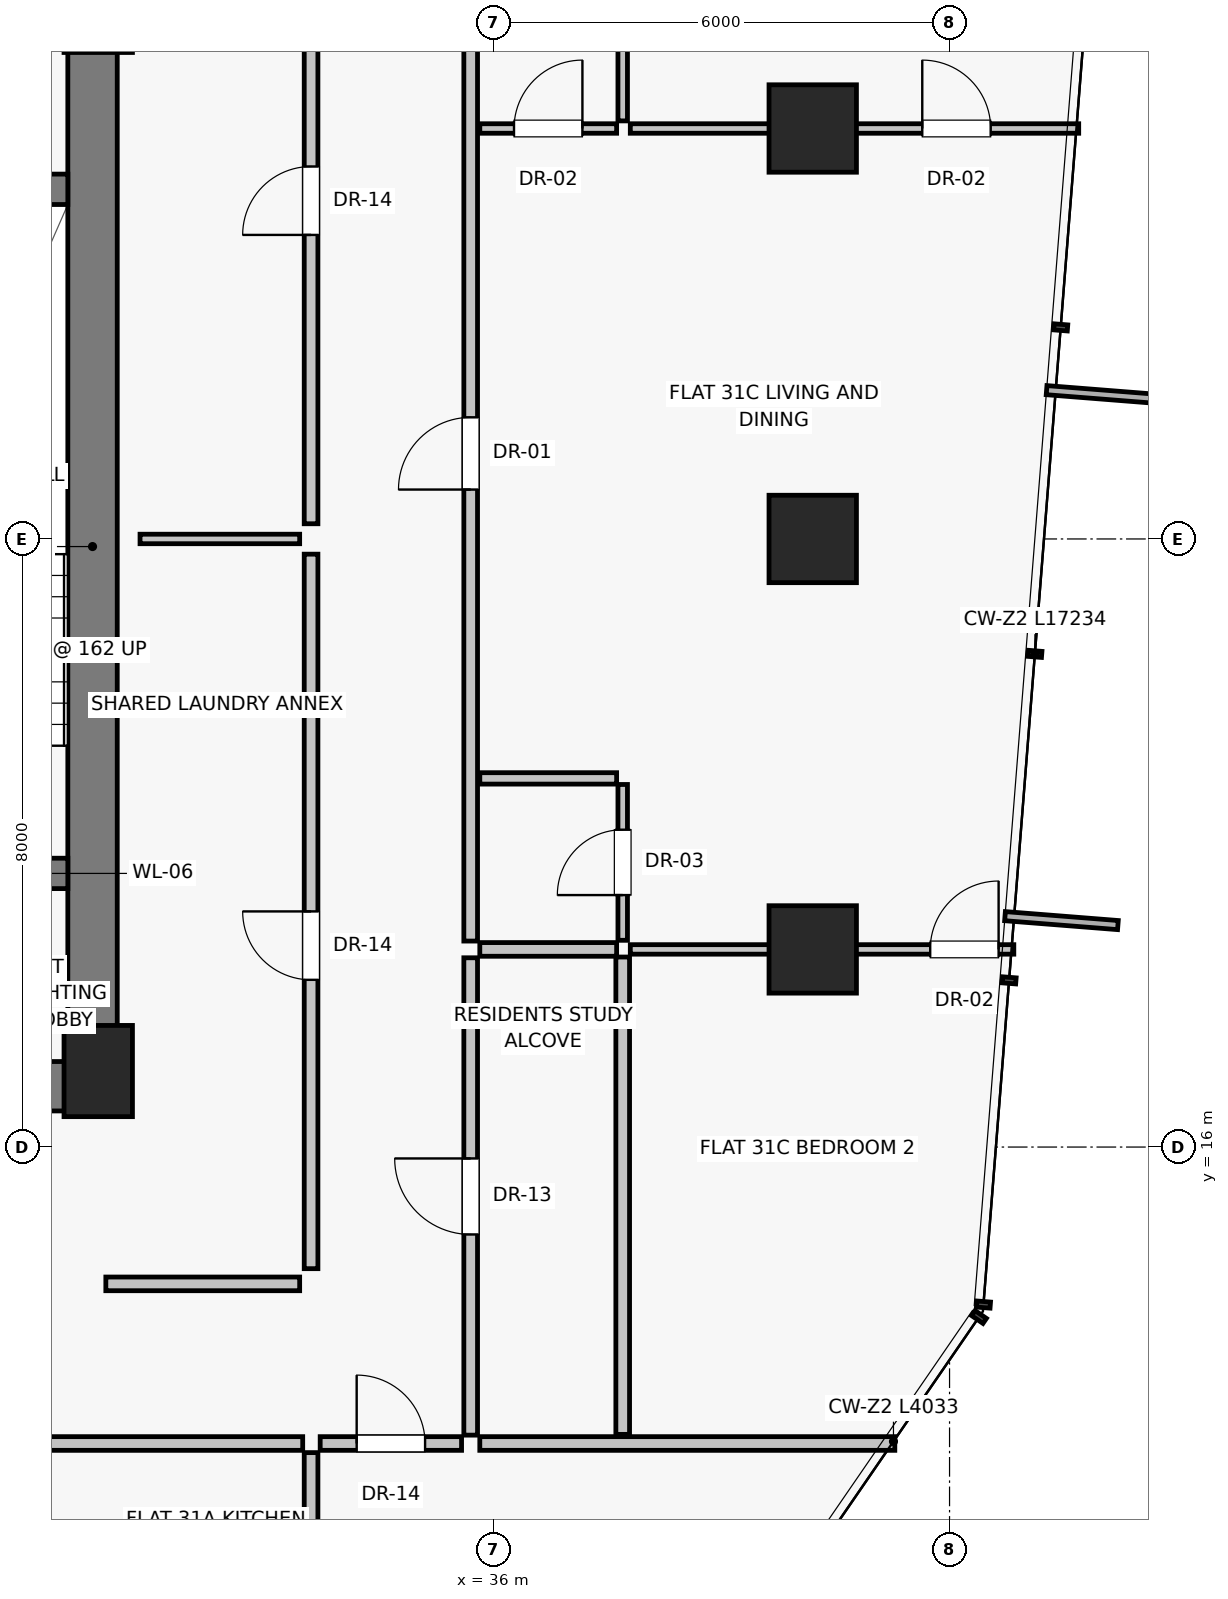
"""IFC4 building model, lengths in metres.
Left out: names, types, materials, properties, quantities, classifications, styles, units other than length and angle.
Written with IfcOpenShell. Run it as: python <this file> out.ifc"""

import sys

from ifc_helpers import new_model, si_unit, direction, frame, frame_2d, origin, origin_2d, place, context, subcontext, project, spatial, rectangle, extrude, source, transform, mapped, element, fill, save


model = new_model("IFC4")
c1 = context("Model", 3, precision=1e-05, world=origin(), true_north=direction((0.0, 1.0)))
c2 = subcontext(c1, "Body", "Model", "MODEL_VIEW")
j1 = project(units=[si_unit("LENGTHUNIT", "METRE"), si_unit("PLANEANGLEUNIT", "RADIAN")], contexts=[c1])
p1 = place(None, origin())
s1 = spatial("IfcSite", under=j1, at=p1, CompositionType="ELEMENT")
p2 = place(p1, origin())
s2 = spatial("IfcBuilding", under=s1, at=p2, CompositionType="ELEMENT")
p3 = place(p2, frame((0.0, 0.0, 113.25)))
s3 = spatial("IfcBuildingStorey", under=s2, at=p3, CompositionType="ELEMENT", Elevation=113.25)
p4 = place(p3, frame((30.8, 17.0, 0.0), z_axis=(0.0, 0.0, 1.0), x_axis=(1.0, 0.0, 0.0)))
e1 = element("IfcColumn", 1, at=p4, inside=s3, PredefinedType="PILASTER", context=c2, shape_type="SweptSolid", body=[
    extrude(rectangle(XDim=0.9, YDim=1.2, at=origin_2d()), origin(), (0.0, 0.0, 1.0), 3.25),
])
for number, where, z_axis, x_axis in (
    (2, (40.2, 18.6, 0.0), (0.0, 0.0, 1.0), (1.0, 0.0, 0.0)),
    (3, (40.2, 24.0, 0.0), (0.0, 0.0, 1.0), (1.0, 0.0, 0.0)),
    (4, (40.2, 29.4, 0.0), (0.0, 0.0, 1.0), (1.0, 0.0, 0.0)),
):
    element("IfcColumn", number, at=place(p3, frame(where, z_axis=z_axis, x_axis=x_axis)), inside=s3, PredefinedType="COLUMN", context=c2, shape_type="SweptSolid", body=[
        extrude(rectangle(XDim=1.15, YDim=1.15, at=origin_2d()), origin(), (0.0, 0.0, 1.0), 3.25),
    ])
p5 = place(p3, frame((30.725, 16.8, 0.0), z_axis=(0.0, 0.0, 1.0), x_axis=(0.0, 1.0, 0.0)))
e5 = element("IfcWall", 5, at=p5, inside=s3, PredefinedType="SHEAR", context=c2, shape_type="SweptSolid", body=[
    extrude(rectangle(XDim=14.2, YDim=0.65, at=frame_2d((7.1, 0.0))), origin(), (0.0, 0.0, 1.0), 3.0),
])
p6 = place(p3, frame((24.95, 16.8, 0.0), z_axis=(0.0, 0.0, 1.0), x_axis=(1.0, 0.0, 0.0)))
e6 = element("IfcWall", 6, at=p6, inside=s3, PredefinedType="SHEAR", context=c2, shape_type="SweptSolid", body=[
    extrude(rectangle(XDim=5.85, YDim=0.65, at=frame_2d((2.925, 0.0))), origin(), (0.0, 0.0, 1.0), 3.0),
])
p7 = place(p6, frame((2.15, 0.0, 0.0)))
e7 = element("IfcOpeningElement", 7, at=p7, cuts=e6, PredefinedType="OPENING", context=c2, shape_type="SweptSolid", body=[
    extrude(rectangle(XDim=1.2, YDim=2.03, at=frame_2d((0.6, 1.015))), frame((0.0, 0.335, 0.0), z_axis=(0.0, -1.0, 0.0), x_axis=(1.0, 0.0, 0.0)), (0.0, 0.0, 1.0), 0.67),
])
p8 = place(p3, frame((27.0, 19.6, 0.0), z_axis=(0.0, 0.0, 1.0), x_axis=(1.0, 0.0, 0.0)))
e8 = element("IfcWall", 8, at=p8, inside=s3, PredefinedType="SHEAR", context=c2, shape_type="SweptSolid", body=[
    extrude(rectangle(XDim=3.4, YDim=0.4, at=frame_2d((1.7, 0.0))), origin(), (0.0, 0.0, 1.0), 3.0),
])
p9 = place(p8, frame((1.05, 0.0, 0.0)))
e9 = element("IfcOpeningElement", 9, at=p9, cuts=e8, PredefinedType="OPENING", context=c2, shape_type="SweptSolid", body=[
    extrude(rectangle(XDim=1.1, YDim=2.03, at=frame_2d((0.55, 1.015))), frame((0.0, 0.21, 0.0), z_axis=(0.0, -1.0, 0.0), x_axis=(1.0, 0.0, 0.0)), (0.0, 0.0, 1.0), 0.42),
])
p10 = place(p3, frame((27.0, 28.6, 0.0), z_axis=(0.0, 0.0, 1.0), x_axis=(1.0, 0.0, 0.0)))
e10 = element("IfcWall", 10, at=p10, inside=s3, PredefinedType="SHEAR", context=c2, shape_type="SweptSolid", body=[
    extrude(rectangle(XDim=3.4, YDim=0.4, at=frame_2d((1.7, 0.0))), origin(), (0.0, 0.0, 1.0), 3.0),
])
p11 = place(p3, frame((33.6, 14.4, 0.0), z_axis=(0.0, 0.0, 1.0), x_axis=(0.0, 1.0, 0.0)))
e11 = element("IfcWall", 11, at=p11, inside=s3, PredefinedType="PARTITIONING", context=c2, shape_type="SweptSolid", body=[
    extrude(rectangle(XDim=9.4, YDim=0.18, at=frame_2d((4.7, 0.0))), origin(), (0.0, 0.0, 1.0), 3.0),
])
p12 = place(p11, frame((3.8, 0.0, 0.0)))
e12 = element("IfcOpeningElement", 12, at=p12, cuts=e11, PredefinedType="OPENING", context=c2, shape_type="SweptSolid", body=[
    extrude(rectangle(XDim=0.9, YDim=2.01, at=frame_2d((0.45, 1.005))), frame((0.0, 0.1, 0.0), z_axis=(0.0, -1.0, 0.0), x_axis=(1.0, 0.0, 0.0)), (0.0, 0.0, 1.0), 0.2),
])
p13 = place(p3, frame((33.6, 24.2, 0.0), z_axis=(0.0, 0.0, 1.0), x_axis=(0.0, 1.0, 0.0)))
e13 = element("IfcWall", 13, at=p13, inside=s3, PredefinedType="PARTITIONING", context=c2, shape_type="SweptSolid", body=[
    extrude(rectangle(XDim=9.2, YDim=0.18, at=frame_2d((4.6, 0.0))), origin(), (0.0, 0.0, 1.0), 3.0),
])
p14 = place(p13, frame((3.8, 0.0, 0.0)))
e14 = element("IfcOpeningElement", 14, at=p14, cuts=e13, PredefinedType="OPENING", context=c2, shape_type="SweptSolid", body=[
    extrude(rectangle(XDim=0.9, YDim=2.01, at=frame_2d((0.45, 1.005))), frame((0.0, 0.1, 0.0), z_axis=(0.0, -1.0, 0.0), x_axis=(1.0, 0.0, 0.0)), (0.0, 0.0, 1.0), 0.2),
])
p15 = place(p3, frame((31.35, 24.0, 0.0), z_axis=(0.0, 0.0, 1.0), x_axis=(1.0, 0.0, 0.0)))
e15 = element("IfcWall", 15, at=p15, inside=s3, PredefinedType="PARTITIONING", context=c2, shape_type="SweptSolid", body=[
    extrude(rectangle(XDim=2.1, YDim=0.125, at=frame_2d((1.05, 0.0))), origin(), (0.0, 0.0, 1.0), 3.0),
])
p16 = place(p3, frame((30.9, 14.2, 0.0), z_axis=(0.0, 0.0, 1.0), x_axis=(1.0, 0.0, 0.0)))
e16 = element("IfcWall", 16, at=p16, inside=s3, PredefinedType="PARTITIONING", context=c2, shape_type="SweptSolid", body=[
    extrude(rectangle(XDim=2.55, YDim=0.18, at=frame_2d((1.275, 0.0))), origin(), (0.0, 0.0, 1.0), 3.0),
])
p17 = place(p3, frame((33.6, 11.98, 0.0), z_axis=(0.0, 0.0, 1.0), x_axis=(0.0, -1.0, 0.0)))
e17 = element("IfcWall", 17, at=p17, inside=s3, PredefinedType="PARTITIONING", context=c2, shape_type="SweptSolid", body=[
    extrude(rectangle(XDim=4.688, YDim=0.18, at=frame_2d((2.344, 0.0))), origin(), (0.0, 0.0, 1.0), 3.0),
])
p18 = place(p3, frame((18.71, 12.1, 0.0), z_axis=(0.0, 0.0, 1.0), x_axis=(1.0, 0.0, 0.0)))
e18 = element("IfcWall", 18, at=p18, inside=s3, PredefinedType="PARTITIONING", context=c2, shape_type="SweptSolid", body=[
    extrude(rectangle(XDim=14.78, YDim=0.18, at=frame_2d((7.39, 0.0))), origin(), (0.0, 0.0, 1.0), 2.58),
])
p19 = place(p18, frame((5.94, 0.0, 0.0)))
e19 = element("IfcOpeningElement", 19, at=p19, cuts=e18, PredefinedType="OPENING", context=c2, shape_type="SweptSolid", body=[
    extrude(rectangle(XDim=0.95, YDim=2.02, at=frame_2d((0.475, 1.01))), frame((0.0, 0.1, 0.0), z_axis=(0.0, -1.0, 0.0), x_axis=(1.0, 0.0, 0.0)), (0.0, 0.0, 1.0), 0.2),
])
p20 = place(p3, frame((35.82, 12.1, 0.0), z_axis=(0.0, 0.0, 1.0), x_axis=(1.0, 0.0, 0.0)))
e20 = element("IfcWall", 20, at=p20, inside=s3, PredefinedType="PARTITIONING", context=c2, shape_type="SweptSolid", body=[
    extrude(rectangle(XDim=5.46, YDim=0.18, at=frame_2d((2.73, 0.0))), origin(), (0.0, 0.0, 1.0), 3.0),
])
p21 = place(p3, frame((35.7, 12.21, 0.0), z_axis=(0.0, 0.0, 1.0), x_axis=(0.0, 1.0, 0.0)))
e21 = element("IfcWall", 21, at=p21, inside=s3, PredefinedType="PARTITIONING", context=c2, shape_type="SweptSolid", body=[
    extrude(rectangle(XDim=6.28, YDim=0.18, at=frame_2d((3.14, 0.0))), origin(), (0.0, 0.0, 1.0), 2.58),
])
p22 = place(p21, frame((2.64, 0.0, 0.0)))
e22 = element("IfcOpeningElement", 22, at=p22, cuts=e21, PredefinedType="OPENING", context=c2, shape_type="SweptSolid", body=[
    extrude(rectangle(XDim=1.0, YDim=2.01, at=frame_2d((0.5, 1.005))), frame((0.0, 0.1, 0.0), z_axis=(0.0, -1.0, 0.0), x_axis=(1.0, 0.0, 0.0)), (0.0, 0.0, 1.0), 0.2),
])
p23 = place(p3, frame((35.7, 18.71, 0.0), z_axis=(0.0, 0.0, 1.0), x_axis=(0.0, 1.0, 0.0)))
e23 = element("IfcWall", 23, at=p23, inside=s3, PredefinedType="PARTITIONING", context=c2, shape_type="SweptSolid", body=[
    extrude(rectangle(XDim=16.88, YDim=0.18, at=frame_2d((8.44, 0.0))), origin(), (0.0, 0.0, 1.0), 2.58),
])
p24 = place(p23, frame((5.94, 0.0, 0.0)))
e24 = element("IfcOpeningElement", 24, at=p24, cuts=e23, PredefinedType="OPENING", context=c2, shape_type="SweptSolid", body=[
    extrude(rectangle(XDim=0.95, YDim=2.02, at=frame_2d((0.475, 1.01))), frame((0.0, 0.1, 0.0), z_axis=(0.0, -1.0, 0.0), x_axis=(1.0, 0.0, 0.0)), (0.0, 0.0, 1.0), 0.2),
])
p25 = place(p3, frame((37.7, 12.22, 0.0), z_axis=(0.0, 0.0, 1.0), x_axis=(0.0, 1.0, 0.0)))
e25 = element("IfcWall", 25, at=p25, inside=s3, PredefinedType="PARTITIONING", context=c2, shape_type="SweptSolid", body=[
    extrude(rectangle(XDim=6.28, YDim=0.18, at=frame_2d((3.14, 0.0))), origin(), (0.0, 0.0, 1.0), 3.0),
])
p26 = place(p3, frame((35.82, 18.6, 0.0), z_axis=(0.0, 0.0, 1.0), x_axis=(1.0, 0.0, 0.0)))
e26 = element("IfcWall", 26, at=p26, inside=s3, PredefinedType="PARTITIONING", context=c2, shape_type="SweptSolid", body=[
    extrude(rectangle(XDim=1.8, YDim=0.18, at=frame_2d((0.9, 0.0))), origin(), (0.0, 0.0, 1.0), 2.378),
])
p27 = place(p3, frame((37.8, 18.6, 0.0), z_axis=(0.0, 0.0, 1.0), x_axis=(1.0, 0.0, 0.0)))
e27 = element("IfcWall", 27, at=p27, inside=s3, PredefinedType="PARTITIONING", context=c2, shape_type="SweptSolid", body=[
    extrude(rectangle(XDim=5.045, YDim=0.125, at=frame_2d((2.523, 0.0))), origin(), (0.0, 0.0, 1.0), 2.378),
])
p28 = place(p27, frame((3.946, 0.0, 0.0)))
e28 = element("IfcOpeningElement", 28, at=p28, cuts=e27, PredefinedType="OPENING", context=c2, shape_type="SweptSolid", body=[
    extrude(rectangle(XDim=0.9, YDim=2.01, at=frame_2d((0.45, 1.005))), frame((0.0, 0.073, 0.0), z_axis=(0.0, -1.0, 0.0), x_axis=(1.0, 0.0, 0.0)), (0.0, 0.0, 1.0), 0.145),
])
p29 = place(p3, frame((35.82, 20.85, 0.0), z_axis=(0.0, 0.0, 1.0), x_axis=(1.0, 0.0, 0.0)))
e29 = element("IfcWall", 29, at=p29, inside=s3, PredefinedType="PARTITIONING", context=c2, shape_type="SweptSolid", body=[
    extrude(rectangle(XDim=1.8, YDim=0.15, at=frame_2d((0.9, 0.0))), origin(), (0.0, 0.0, 1.0), 3.0),
])
p30 = place(p3, frame((37.7, 18.72, 0.0), z_axis=(0.0, 0.0, 1.0), x_axis=(0.0, 1.0, 0.0)))
e30 = element("IfcWall", 30, at=p30, inside=s3, PredefinedType="PARTITIONING", context=c2, shape_type="SweptSolid", body=[
    extrude(rectangle(XDim=2.05, YDim=0.125, at=frame_2d((1.025, 0.0))), origin(), (0.0, 0.0, 1.0), 3.0),
])
p31 = place(p30, frame((0.595, 0.0, 0.0)))
e31 = element("IfcOpeningElement", 31, at=p31, cuts=e30, PredefinedType="OPENING", context=c2, shape_type="SweptSolid", body=[
    extrude(rectangle(XDim=0.86, YDim=2.01, at=frame_2d((0.43, 1.005))), frame((0.0, 0.073, 0.0), z_axis=(0.0, -1.0, 0.0), x_axis=(1.0, 0.0, 0.0)), (0.0, 0.0, 1.0), 0.145),
])
p32 = place(p3, frame((35.82, 29.4, 0.0), z_axis=(0.0, 0.0, 1.0), x_axis=(1.0, 0.0, 0.0)))
e32 = element("IfcWall", 32, at=p32, inside=s3, PredefinedType="PARTITIONING", context=c2, shape_type="SweptSolid", body=[
    extrude(rectangle(XDim=1.8, YDim=0.125, at=frame_2d((0.9, 0.0))), origin(), (0.0, 0.0, 1.0), 2.378),
])
p33 = place(p32, frame((0.45, 0.0, 0.0)))
e33 = element("IfcOpeningElement", 33, at=p33, cuts=e32, PredefinedType="OPENING", context=c2, shape_type="SweptSolid", body=[
    extrude(rectangle(XDim=0.9, YDim=2.01, at=frame_2d((0.45, 1.005))), frame((0.0, 0.073, 0.0), z_axis=(0.0, -1.0, 0.0), x_axis=(1.0, 0.0, 0.0)), (0.0, 0.0, 1.0), 0.145),
])
p34 = place(p3, frame((37.7, 29.5, 0.0), z_axis=(0.0, 0.0, 1.0), x_axis=(0.0, 1.0, 0.0)))
e34 = element("IfcWall", 34, at=p34, inside=s3, PredefinedType="PARTITIONING", context=c2, shape_type="SweptSolid", body=[
    extrude(rectangle(XDim=6.08, YDim=0.125, at=frame_2d((3.04, 0.0))), origin(), (0.0, 0.0, 1.0), 3.0),
])
p35 = place(p3, frame((37.8, 29.4, 0.0), z_axis=(0.0, 0.0, 1.0), x_axis=(1.0, 0.0, 0.0)))
e35 = element("IfcWall", 35, at=p35, inside=s3, PredefinedType="PARTITIONING", context=c2, shape_type="SweptSolid", body=[
    extrude(rectangle(XDim=5.899, YDim=0.125, at=frame_2d((2.95, 0.0))), origin(), (0.0, 0.0, 1.0), 2.378),
])
p36 = place(p35, frame((3.841, 0.0, 0.0)))
e36 = element("IfcOpeningElement", 36, at=p36, cuts=e35, PredefinedType="OPENING", context=c2, shape_type="SweptSolid", body=[
    extrude(rectangle(XDim=0.9, YDim=2.01, at=frame_2d((0.45, 1.005))), frame((0.0, 0.073, 0.0), z_axis=(0.0, -1.0, 0.0), x_axis=(1.0, 0.0, 0.0)), (0.0, 0.0, 1.0), 0.145),
])
p37 = place(p3, frame((33.72, 12.1, 0.0), z_axis=(0.0, 0.0, 1.0), x_axis=(1.0, 0.0, 0.0)))
e37 = element("IfcWall", 37, at=p37, inside=s3, PredefinedType="PARTITIONING", context=c2, shape_type="SweptSolid", body=[
    extrude(rectangle(XDim=1.86, YDim=0.18, at=frame_2d((0.93, 0.0))), origin(), (0.0, 0.0, 1.0), 3.0),
])
p38 = place(p37, frame((0.48, 0.0, 0.0)))
e38 = element("IfcOpeningElement", 38, at=p38, cuts=e37, PredefinedType="OPENING", context=c2, shape_type="SweptSolid", body=[
    extrude(rectangle(XDim=0.9, YDim=2.01, at=frame_2d((0.45, 1.005))), frame((0.0, 0.1, 0.0), z_axis=(0.0, -1.0, 0.0), x_axis=(1.0, 0.0, 0.0)), (0.0, 0.0, 1.0), 0.2),
])
m1 = source(origin(), c2, "Body", "SweptSolid", [
    extrude(rectangle(XDim=0.9, YDim=2.01, at=frame_2d((0.45, 1.005))), frame((0.0, 0.025, 0.0), z_axis=(0.0, -1.0, 0.0), x_axis=(1.0, 0.0, 0.0)), (0.0, 0.0, 1.0), 0.05),
])
p39 = place(p12, origin())
e39 = element("IfcDoor", 39, at=p39, inside=s3, OperationType="SINGLE_SWING_RIGHT", PredefinedType="DOOR", context=c2, shape_type="MappedRepresentation", body=[
    mapped(m1, transform((0.0, 0.0, 0.0), scale=1.0)),
])
fill(e12, e39)
p40 = place(p14, origin())
e40 = element("IfcDoor", 40, at=p40, inside=s3, OperationType="SINGLE_SWING_LEFT", PredefinedType="DOOR", context=c2, shape_type="MappedRepresentation", body=[
    mapped(m1, transform((0.0, 0.0, 0.0), scale=1.0)),
])
fill(e14, e40)
m2 = source(origin(), c2, "Body", "SweptSolid", [
    extrude(rectangle(XDim=1.0, YDim=2.01, at=frame_2d((0.5, 1.005))), frame((0.0, 0.025, 0.0), z_axis=(0.0, -1.0, 0.0), x_axis=(1.0, 0.0, 0.0)), (0.0, 0.0, 1.0), 0.05),
])
p41 = place(p22, origin())
e41 = element("IfcDoor", 41, at=p41, inside=s3, OperationType="SINGLE_SWING_RIGHT", PredefinedType="DOOR", context=c2, shape_type="MappedRepresentation", body=[
    mapped(m2, transform((0.0, 0.0, 0.0), scale=1.0)),
])
fill(e22, e41)
m3 = source(origin(), c2, "Body", "SweptSolid", [
    extrude(rectangle(XDim=0.95, YDim=2.02, at=frame_2d((0.475, 1.01))), frame((0.0, 0.025, 0.0), z_axis=(0.0, -1.0, 0.0), x_axis=(1.0, 0.0, 0.0)), (0.0, 0.0, 1.0), 0.05),
])
p42 = place(p24, origin())
e42 = element("IfcDoor", 42, at=p42, inside=s3, OperationType="SINGLE_SWING_LEFT", PredefinedType="DOOR", context=c2, shape_type="MappedRepresentation", body=[
    mapped(m3, transform((0.0, 0.0, 0.0), scale=1.0)),
])
fill(e24, e42)
p43 = place(p28, origin())
e43 = element("IfcDoor", 43, at=p43, inside=s3, OperationType="SINGLE_SWING_RIGHT", PredefinedType="DOOR", context=c2, shape_type="MappedRepresentation", body=[
    mapped(m1, transform((0.0, 0.0, 0.0), scale=1.0)),
])
fill(e28, e43)
m4 = source(origin(), c2, "Body", "SweptSolid", [
    extrude(rectangle(XDim=0.86, YDim=2.01, at=frame_2d((0.43, 1.005))), frame((0.0, 0.025, 0.0), z_axis=(0.0, -1.0, 0.0), x_axis=(1.0, 0.0, 0.0)), (0.0, 0.0, 1.0), 0.05),
])
p44 = place(p31, origin())
e44 = element("IfcDoor", 44, at=p44, inside=s3, OperationType="SINGLE_SWING_LEFT", PredefinedType="DOOR", context=c2, shape_type="MappedRepresentation", body=[
    mapped(m4, transform((0.0, 0.0, 0.0), scale=1.0)),
])
fill(e31, e44)
p45 = place(p33, origin())
e45 = element("IfcDoor", 45, at=p45, inside=s3, OperationType="SINGLE_SWING_RIGHT", PredefinedType="DOOR", context=c2, shape_type="MappedRepresentation", body=[
    mapped(m1, transform((0.0, 0.0, 0.0), scale=1.0)),
])
fill(e33, e45)
p46 = place(p36, origin())
e46 = element("IfcDoor", 46, at=p46, inside=s3, OperationType="SINGLE_SWING_LEFT", PredefinedType="DOOR", context=c2, shape_type="MappedRepresentation", body=[
    mapped(m1, transform((0.0, 0.0, 0.0), scale=1.0)),
])
fill(e36, e46)
p47 = place(p38, origin())
e47 = element("IfcDoor", 47, at=p47, inside=s3, OperationType="SINGLE_SWING_LEFT", PredefinedType="DOOR", context=c2, shape_type="MappedRepresentation", body=[
    mapped(m1, transform((0.0, 0.0, 0.0), scale=1.0)),
])
fill(e38, e47)
save(model, sys.argv[1])
